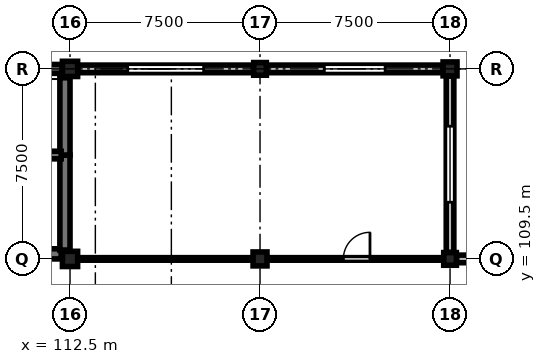
"""IFC4 building model, lengths in metres.
Left out: names, types, materials, properties, quantities, classifications, styles, units other than length and angle.
Written with IfcOpenShell. Run it as: python <this file> out.ifc"""

import sys

from ifc_helpers import new_model, si_unit, direction, frame, frame_2d, origin, origin_2d, place, context, subcontext, project, spatial, rectangle, circle, extrude, element, fill, save


model = new_model("IFC4")
c1 = context("Model", 3, precision=1e-05, world=origin(), true_north=direction((0.0, 1.0)))
c2 = subcontext(c1, "Body", "Model", "MODEL_VIEW")
j1 = project(units=[si_unit("LENGTHUNIT", "METRE"), si_unit("PLANEANGLEUNIT", "RADIAN")], contexts=[c1])
p1 = place(None, origin())
s1 = spatial("IfcSite", under=j1, at=p1, CompositionType="ELEMENT")
p2 = place(p1, origin())
s2 = spatial("IfcBuilding", under=s1, at=p2, CompositionType="ELEMENT")
p3 = place(p2, frame((0.0, 0.0, 14.1)))
s3 = spatial("IfcBuildingStorey", under=s2, at=p3, CompositionType="ELEMENT", Elevation=14.1)
p4 = place(p3, frame((112.5, 109.5, 0.0), z_axis=(0.0, 0.0, 1.0), x_axis=(1.0, 0.0, 0.0)))
e1 = element("IfcColumn", 1, at=p4, inside=s3, PredefinedType="COLUMN", context=c2, shape_type="SweptSolid", body=[
    extrude(rectangle(XDim=0.6, YDim=0.6, at=origin_2d()), origin(), (0.0, 0.0, 1.0), 3.75),
])
p5 = place(p3, frame((112.5, 117.0, 0.0), z_axis=(0.0, 0.0, 1.0), x_axis=(1.0, 0.0, 0.0)))
e2 = element("IfcColumn", 2, at=p5, inside=s3, PredefinedType="COLUMN", context=c2, shape_type="SweptSolid", body=[
    extrude(circle(Radius=0.3, at=origin_2d()), origin(), (0.0, 0.0, 1.0), 3.75),
])
p6 = place(p3, frame((120.0, 109.5, 0.0), z_axis=(0.0, 0.0, 1.0), x_axis=(1.0, 0.0, 0.0)))
e3 = element("IfcColumn", 3, at=p6, inside=s3, PredefinedType="COLUMN", context=c2, shape_type="SweptSolid", body=[
    extrude(rectangle(XDim=0.55, YDim=0.55, at=origin_2d()), origin(), (0.0, 0.0, 1.0), 3.75),
])
for number, where, z_axis, x_axis in (
    (4, (120.0, 117.0, 0.0), (0.0, 0.0, 1.0), (1.0, 0.0, 0.0)),
    (5, (127.5, 109.5, 0.0), (0.0, 0.0, 1.0), (1.0, 0.0, 0.0)),
):
    element("IfcColumn", number, at=place(p3, frame(where, z_axis=z_axis, x_axis=x_axis)), inside=s3, PredefinedType="COLUMN", context=c2, shape_type="SweptSolid", body=[
        extrude(rectangle(XDim=0.5, YDim=0.5, at=origin_2d()), origin(), (0.0, 0.0, 1.0), 3.75),
    ])
p7 = place(p3, frame((127.5, 117.0, 0.0), z_axis=(0.0, 0.0, 1.0), x_axis=(1.0, 0.0, 0.0)))
e6 = element("IfcColumn", 6, at=p7, inside=s3, PredefinedType="COLUMN", context=c2, shape_type="SweptSolid", body=[
    extrude(rectangle(XDim=0.55, YDim=0.55, at=origin_2d()), origin(), (0.0, 0.0, 1.0), 3.75),
])
p8 = place(p3, frame((105.31, 117.0, 0.0), z_axis=(0.0, 0.0, 1.0), x_axis=(1.0, 0.0, 0.0)))
e7 = element("IfcWall", 7, at=p8, inside=s3, PredefinedType="SHEAR", context=c2, shape_type="SweptSolid", body=[
    extrude(rectangle(XDim=6.88, YDim=0.35, at=frame_2d((3.44, 0.0))), origin(), (0.0, 0.0, 1.0), 3.47),
])
p9 = place(p3, frame((112.81, 117.0, 0.0), z_axis=(0.0, 0.0, 1.0), x_axis=(1.0, 0.0, 0.0)))
e8 = element("IfcWall", 8, at=p9, inside=s3, PredefinedType="STANDARD", context=c2, shape_type="SweptSolid", body=[
    extrude(rectangle(XDim=6.93, YDim=0.3, at=frame_2d((3.465, 0.0))), origin(), (0.0, 0.0, 1.0), 2.87),
])
p10 = place(p9, frame((1.965, 0.0, 1.1)))
e9 = element("IfcOpeningElement", 9, at=p10, cuts=e8, PredefinedType="OPENING", context=c2, shape_type="SweptSolid", body=[
    extrude(rectangle(XDim=3.0, YDim=1.2, at=frame_2d((1.5, 0.6))), frame((0.0, 0.16, 0.0), z_axis=(0.0, -1.0, 0.0), x_axis=(1.0, 0.0, 0.0)), (0.0, 0.0, 1.0), 0.32),
])
p11 = place(p3, frame((120.26, 117.0, 0.0), z_axis=(0.0, 0.0, 1.0), x_axis=(1.0, 0.0, 0.0)))
e10 = element("IfcWall", 10, at=p11, inside=s3, PredefinedType="STANDARD", context=c2, shape_type="SweptSolid", body=[
    extrude(rectangle(XDim=6.955, YDim=0.3, at=frame_2d((3.478, 0.0))), origin(), (0.0, 0.0, 1.0), 2.87),
])
p12 = place(p11, frame((2.278, 0.0, 1.1)))
e11 = element("IfcOpeningElement", 11, at=p12, cuts=e10, PredefinedType="OPENING", context=c2, shape_type="SweptSolid", body=[
    extrude(rectangle(XDim=2.4, YDim=1.2, at=frame_2d((1.2, 0.6))), frame((0.0, 0.16, 0.0), z_axis=(0.0, -1.0, 0.0), x_axis=(1.0, 0.0, 0.0)), (0.0, 0.0, 1.0), 0.32),
])
p13 = place(p3, frame((127.5, 116.715, 0.0), z_axis=(0.0, 0.0, 1.0), x_axis=(0.0, -1.0, 0.0)))
e12 = element("IfcWall", 12, at=p13, inside=s3, PredefinedType="STANDARD", context=c2, shape_type="SweptSolid", body=[
    extrude(rectangle(XDim=6.955, YDim=0.3, at=frame_2d((3.478, 0.0))), origin(), (0.0, 0.0, 1.0), 2.87),
])
p14 = place(p13, frame((1.978, 0.0, 1.1)))
e13 = element("IfcOpeningElement", 13, at=p14, cuts=e12, PredefinedType="OPENING", context=c2, shape_type="SweptSolid", body=[
    extrude(rectangle(XDim=3.0, YDim=1.2, at=frame_2d((1.5, 0.6))), frame((0.0, 0.16, 0.0), z_axis=(0.0, -1.0, 0.0), x_axis=(1.0, 0.0, 0.0)), (0.0, 0.0, 1.0), 0.32),
])
p15 = place(p3, frame((127.76, 109.5, 0.0), z_axis=(0.0, 0.0, 1.0), x_axis=(1.0, 0.0, 0.0)))
e14 = element("IfcWall", 14, at=p15, inside=s3, PredefinedType="STANDARD", context=c2, shape_type="SweptSolid", body=[
    extrude(rectangle(XDim=6.955, YDim=0.3, at=frame_2d((3.478, 0.0))), origin(), (0.0, 0.0, 1.0), 2.87),
])
p16 = place(p15, frame((1.978, 0.0, 1.1)))
e15 = element("IfcOpeningElement", 15, at=p16, cuts=e14, PredefinedType="OPENING", context=c2, shape_type="SweptSolid", body=[
    extrude(rectangle(XDim=3.0, YDim=1.2, at=frame_2d((1.5, 0.6))), frame((0.0, 0.16, 0.0), z_axis=(0.0, -1.0, 0.0), x_axis=(1.0, 0.0, 0.0)), (0.0, 0.0, 1.0), 0.32),
])
p17 = place(p3, frame((105.9, 109.7, 0.0), z_axis=(0.0, 0.0, 1.0), x_axis=(1.0, 0.0, 0.0)))
e16 = element("IfcWall", 16, at=p17, inside=s3, PredefinedType="SHEAR", context=c2, shape_type="SweptSolid", body=[
    extrude(rectangle(XDim=6.25, YDim=0.4, at=frame_2d((3.125, 0.0))), origin(), (0.0, 0.0, 1.0), 3.47),
])
p18 = place(p17, frame((2.2, 0.0, 0.0)))
e17 = element("IfcOpeningElement", 17, at=p18, cuts=e16, PredefinedType="OPENING", context=c2, shape_type="SweptSolid", body=[
    extrude(rectangle(XDim=1.8, YDim=2.25, at=frame_2d((0.9, 1.125))), frame((0.0, 0.21, 0.0), z_axis=(0.0, -1.0, 0.0), x_axis=(1.0, 0.0, 0.0)), (0.0, 0.0, 1.0), 0.42),
])
p19 = place(p3, frame((112.3, 109.85, 0.0), z_axis=(0.0, 0.0, 1.0), x_axis=(0.0, 1.0, 0.0)))
e18 = element("IfcWall", 18, at=p19, inside=s3, PredefinedType="SHEAR", context=c2, shape_type="SweptSolid", body=[
    extrude(rectangle(XDim=3.75, YDim=0.4, at=frame_2d((1.875, 0.0))), origin(), (0.0, 0.0, 1.0), 3.47),
])
p20 = place(p3, frame((112.3, 113.6, 0.0), z_axis=(0.0, 0.0, 1.0), x_axis=(0.0, 1.0, 0.0)))
e19 = element("IfcWall", 19, at=p20, inside=s3, PredefinedType="SHEAR", context=c2, shape_type="SweptSolid", body=[
    extrude(rectangle(XDim=3.05, YDim=0.4, at=frame_2d((1.525, 0.0))), origin(), (0.0, 0.0, 1.0), 3.47),
])
p21 = place(p3, frame((105.9, 113.6, 0.0), z_axis=(0.0, 0.0, 1.0), x_axis=(1.0, 0.0, 0.0)))
e20 = element("IfcWall", 20, at=p21, inside=s3, PredefinedType="SHEAR", context=c2, shape_type="SweptSolid", body=[
    extrude(rectangle(XDim=6.25, YDim=0.3, at=frame_2d((3.125, 0.0))), origin(), (0.0, 0.0, 1.0), 3.47),
])
p22 = place(p21, frame((0.95, 0.0, 0.0)))
e21 = element("IfcOpeningElement", 21, at=p22, cuts=e20, PredefinedType="OPENING", context=c2, shape_type="SweptSolid", body=[
    extrude(rectangle(XDim=1.3, YDim=2.2, at=frame_2d((0.65, 1.1))), frame((0.0, 0.16, 0.0), z_axis=(0.0, -1.0, 0.0), x_axis=(1.0, 0.0, 0.0)), (0.0, 0.0, 1.0), 0.32),
])
p23 = place(p21, frame((4.1, 0.0, 0.0)))
e22 = element("IfcOpeningElement", 22, at=p23, cuts=e20, PredefinedType="OPENING", context=c2, shape_type="SweptSolid", body=[
    extrude(rectangle(XDim=1.4, YDim=2.25, at=frame_2d((0.7, 1.125))), frame((0.0, 0.16, 0.0), z_axis=(0.0, -1.0, 0.0), x_axis=(1.0, 0.0, 0.0)), (0.0, 0.0, 1.0), 0.32),
])
p24 = place(p3, frame((112.8, 109.5, 0.0), z_axis=(0.0, 0.0, 1.0), x_axis=(1.0, 0.0, 0.0)))
e23 = element("IfcWall", 23, at=p24, inside=s3, PredefinedType="PARTITIONING", context=c2, shape_type="SweptSolid", body=[
    extrude(rectangle(XDim=14.35, YDim=0.1, at=frame_2d((7.175, 0.0))), origin(), (0.0, 0.0, 1.0), 2.855),
])
p25 = place(p24, frame((10.49, 0.0, 0.0)))
e24 = element("IfcOpeningElement", 24, at=p25, cuts=e23, PredefinedType="OPENING", context=c2, shape_type="SweptSolid", body=[
    extrude(rectangle(XDim=1.05, YDim=2.2, at=frame_2d((0.525, 1.1))), frame((0.0, 0.06, 0.0), z_axis=(0.0, -1.0, 0.0), x_axis=(1.0, 0.0, 0.0)), (0.0, 0.0, 1.0), 0.12),
])
p26 = place(p10, origin())
e25 = element("IfcWindow", 25, at=p26, inside=s3, PartitioningType="SINGLE_PANEL", PredefinedType="WINDOW", context=c2, shape_type="SweptSolid", body=[
    extrude(rectangle(XDim=3.0, YDim=1.2, at=frame_2d((1.5, 0.6))), frame((0.0, 0.03, 0.0), z_axis=(0.0, -1.0, 0.0), x_axis=(1.0, 0.0, 0.0)), (0.0, 0.0, 1.0), 0.06),
])
fill(e9, e25)
p27 = place(p12, origin())
e26 = element("IfcWindow", 26, at=p27, inside=s3, PartitioningType="SINGLE_PANEL", PredefinedType="WINDOW", context=c2, shape_type="SweptSolid", body=[
    extrude(rectangle(XDim=2.4, YDim=1.2, at=frame_2d((1.2, 0.6))), frame((0.0, 0.03, 0.0), z_axis=(0.0, -1.0, 0.0), x_axis=(1.0, 0.0, 0.0)), (0.0, 0.0, 1.0), 0.06),
])
fill(e11, e26)
p28 = place(p14, origin())
e27 = element("IfcWindow", 27, at=p28, inside=s3, PartitioningType="SINGLE_PANEL", PredefinedType="WINDOW", context=c2, shape_type="SweptSolid", body=[
    extrude(rectangle(XDim=3.0, YDim=1.2, at=frame_2d((1.5, 0.6))), frame((0.0, 0.03, 0.0), z_axis=(0.0, -1.0, 0.0), x_axis=(1.0, 0.0, 0.0)), (0.0, 0.0, 1.0), 0.06),
])
fill(e13, e27)
p29 = place(p25, origin())
e28 = element("IfcDoor", 28, at=p29, inside=s3, OperationType="SINGLE_SWING_RIGHT", PredefinedType="DOOR", context=c2, shape_type="SweptSolid", body=[
    extrude(rectangle(XDim=1.05, YDim=2.2, at=frame_2d((0.525, 1.1))), frame((0.0, 0.025, 0.0), z_axis=(0.0, -1.0, 0.0), x_axis=(1.0, 0.0, 0.0)), (0.0, 0.0, 1.0), 0.05),
])
fill(e24, e28)
save(model, sys.argv[1])
